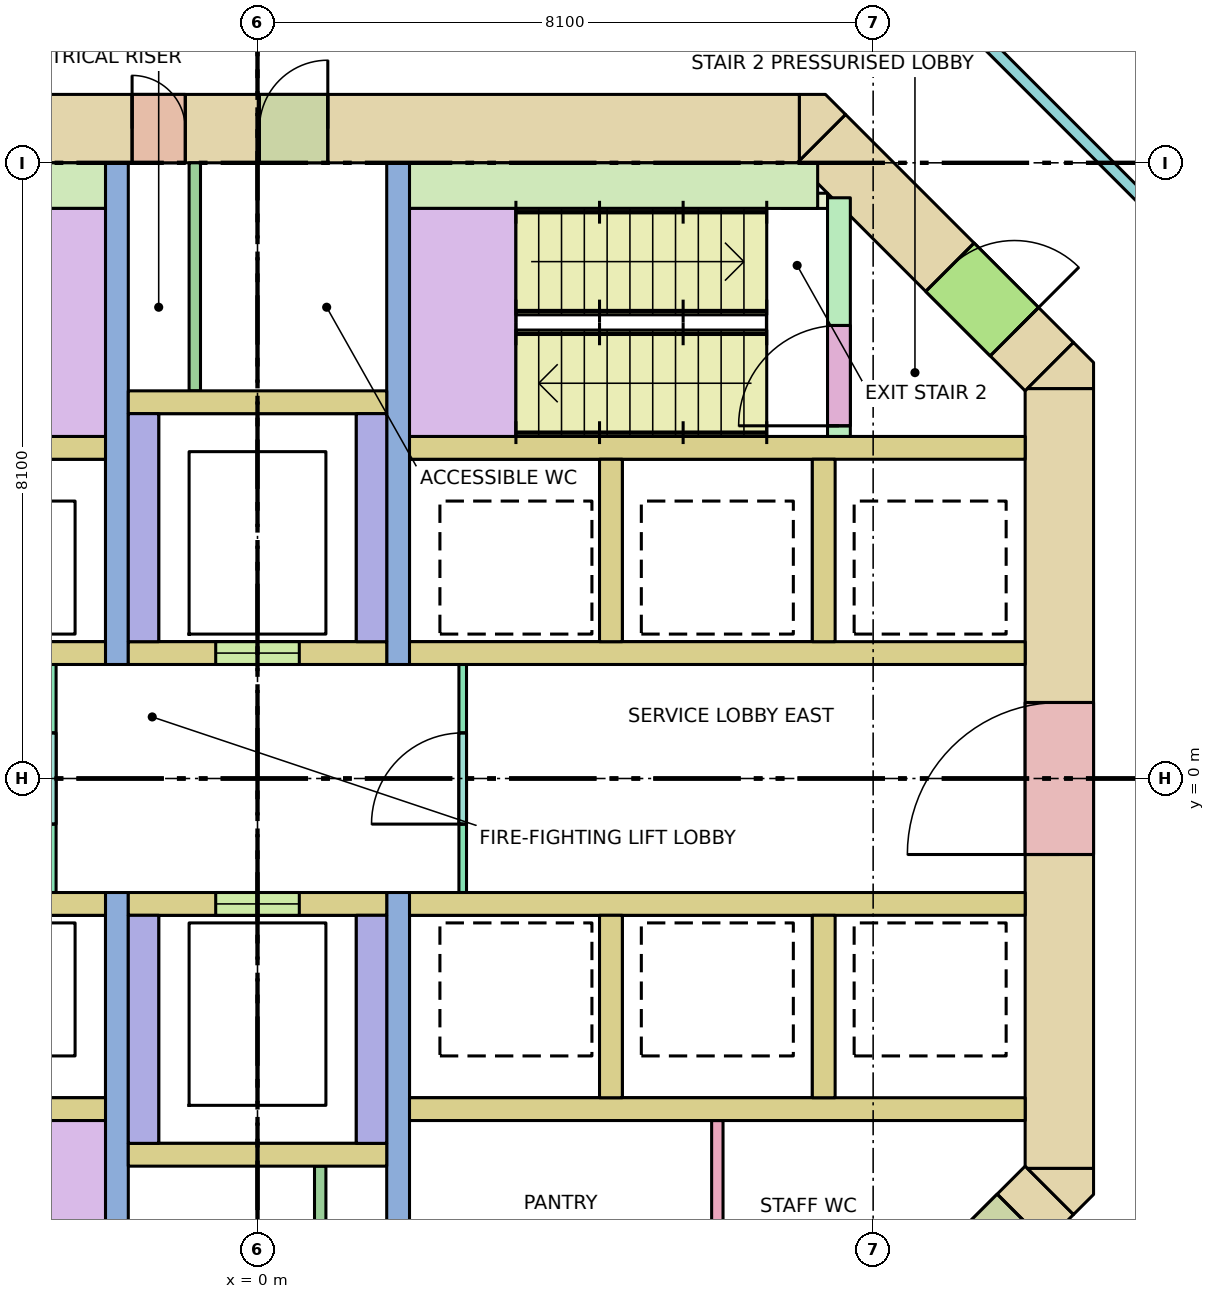
"""IFC4 building model, lengths in metres.
Left out: names, types, materials, properties, quantities, classifications, styles, units other than length and angle.
Written with IfcOpenShell. Run it as: python <this file> out.ifc"""

import sys

from ifc_helpers import new_model, si_unit, direction, frame, frame_2d, origin, place, context, subcontext, project, spatial, polyline, rectangle, outline, extrude, element, fill, save


model = new_model("IFC4")
c1 = context("Model", 3, precision=1e-05, world=origin(), true_north=direction((0.0, 1.0)))
c2 = subcontext(c1, "Body", "Model", "MODEL_VIEW")
j1 = project(units=[si_unit("LENGTHUNIT", "METRE"), si_unit("PLANEANGLEUNIT", "RADIAN")], contexts=[c1])
p1 = place(None, origin())
s1 = spatial("IfcSite", under=j1, at=p1, CompositionType="ELEMENT")
p2 = place(p1, origin())
s2 = spatial("IfcBuilding", under=s1, at=p2, CompositionType="ELEMENT")
p3 = place(p2, frame((0.0, 0.0, 27.0)))
s3 = spatial("IfcBuildingStorey", under=s2, at=p3, CompositionType="ELEMENT", Elevation=27.0)
p4 = place(p3, frame((-7.13, 8.55, -0.28), z_axis=(0.0, 0.0, 1.0), x_axis=(1.0, 0.0, 0.0)))
e1 = element("IfcWall", 1, at=p4, inside=s3, PredefinedType="SHEAR", context=c2, shape_type="SweptSolid", body=[
    extrude(rectangle(XDim=14.26, YDim=0.9, at=frame_2d((7.13, 0.0))), origin(), (0.0, 0.0, 1.0), 4.0),
])
p5 = place(p4, frame((5.48, 0.0, 0.28)))
e2 = element("IfcOpeningElement", 2, at=p5, cuts=e1, PredefinedType="OPENING", context=c2, shape_type="SweptSolid", body=[
    extrude(rectangle(XDim=0.7, YDim=2.1, at=frame_2d((0.35, 1.05))), frame((0.0, 0.46, 0.0), z_axis=(0.0, -1.0, 0.0), x_axis=(1.0, 0.0, 0.0)), (0.0, 0.0, 1.0), 0.92),
])
p6 = place(p4, frame((7.155, 0.0, 0.28)))
e3 = element("IfcOpeningElement", 3, at=p6, cuts=e1, PredefinedType="OPENING", context=c2, shape_type="SweptSolid", body=[
    extrude(rectangle(XDim=0.9, YDim=2.1, at=frame_2d((0.45, 1.05))), frame((0.0, 0.46, 0.0), z_axis=(0.0, -1.0, 0.0), x_axis=(1.0, 0.0, 0.0)), (0.0, 0.0, 1.0), 0.92),
])
p7 = place(p3, frame((10.55, -5.13, -0.28), z_axis=(0.0, 0.0, 1.0), x_axis=(0.0, 1.0, 0.0)))
e4 = element("IfcWall", 4, at=p7, inside=s3, PredefinedType="SHEAR", context=c2, shape_type="SweptSolid", body=[
    extrude(rectangle(XDim=10.26, YDim=0.9, at=frame_2d((5.13, 0.0))), origin(), (0.0, 0.0, 1.0), 4.0),
])
p8 = place(p7, frame((4.13, 0.0, 0.28)))
e5 = element("IfcOpeningElement", 5, at=p8, cuts=e4, PredefinedType="OPENING", context=c2, shape_type="SweptSolid", body=[
    extrude(rectangle(XDim=2.0, YDim=2.1, at=frame_2d((1.0, 1.05))), frame((0.0, 0.46, 0.0), z_axis=(0.0, -1.0, 0.0), x_axis=(1.0, 0.0, 0.0)), (0.0, 0.0, 1.0), 0.92),
])
p9 = place(p3, frame((7.418, 8.418, -0.28), z_axis=(0.0, 0.0, 1.0), x_axis=(0.707106781187, -0.707106781187, 0.0)))
e6 = element("IfcWall", 6, at=p9, inside=s3, PredefinedType="SHEAR", context=c2, shape_type="SweptSolid", body=[
    extrude(rectangle(XDim=4.243, YDim=0.9, at=frame_2d((2.121, 0.0))), origin(), (0.0, 0.0, 1.0), 4.0),
])
p10 = place(p9, frame((2.393, 0.0, 0.28)))
e7 = element("IfcOpeningElement", 7, at=p10, cuts=e6, PredefinedType="OPENING", context=c2, shape_type="SweptSolid", body=[
    extrude(rectangle(XDim=1.2, YDim=2.1, at=frame_2d((0.6, 1.05))), frame((0.0, 0.46, 0.0), z_axis=(0.0, -1.0, 0.0), x_axis=(1.0, 0.0, 0.0)), (0.0, 0.0, 1.0), 0.92),
])
p11 = place(p3, frame((10.418, -5.418, -0.28), z_axis=(0.0, 0.0, 1.0), x_axis=(-0.707106781187, -0.707106781187, 0.0)))
e8 = element("IfcWall", 8, at=p11, inside=s3, PredefinedType="SHEAR", context=c2, shape_type="SweptSolid", body=[
    extrude(rectangle(XDim=4.243, YDim=0.9, at=frame_2d((2.121, 0.0))), origin(), (0.0, 0.0, 1.0), 4.0),
])
p12 = place(p11, frame((0.52, 0.0, 0.28)))
e9 = element("IfcOpeningElement", 9, at=p12, cuts=e8, PredefinedType="OPENING", context=c2, shape_type="SweptSolid", body=[
    extrude(rectangle(XDim=0.9, YDim=2.1, at=frame_2d((0.45, 1.05))), frame((0.0, 0.46, 0.0), z_axis=(0.0, -1.0, 0.0), x_axis=(1.0, 0.0, 0.0)), (0.0, 0.0, 1.0), 0.92),
])
p13 = place(p3, frame((0.0, 0.0, -0.28)))
e10 = element("IfcWall", 10, at=p13, inside=s3, PredefinedType="SHEAR", context=c2, shape_type="SweptSolid", body=[
    extrude(outline(polyline([(11.0, -5.473), (10.736, -5.736), (10.13, -5.13), (11.0, -5.13), (11.0, -5.473)])), origin(), (0.0, 0.0, 1.0), 4.0),
])
p14 = place(p3, frame((0.0, 0.0, -0.28)))
e11 = element("IfcWall", 11, at=p14, inside=s3, PredefinedType="SHEAR", context=c2, shape_type="SweptSolid", body=[
    extrude(outline(polyline([(11.0, 5.473), (11.0, 5.13), (10.13, 5.13), (10.736, 5.736), (11.0, 5.473)])), origin(), (0.0, 0.0, 1.0), 4.0),
])
p15 = place(p3, frame((0.0, 0.0, -0.28)))
e12 = element("IfcWall", 12, at=p15, inside=s3, PredefinedType="SHEAR", context=c2, shape_type="SweptSolid", body=[
    extrude(outline(polyline([(7.473, 9.0), (7.736, 8.736), (7.13, 8.13), (7.13, 9.0), (7.473, 9.0)])), origin(), (0.0, 0.0, 1.0), 4.0),
])
for number, where, z_axis, x_axis in (
    (13, (-10.1, 4.35, 0.0), (0.0, 0.0, 1.0), (1.0, 0.0, 0.0)),
    (14, (-10.1, -4.35, 0.0), (0.0, 0.0, 1.0), (1.0, 0.0, 0.0)),
    (15, (2.0, 4.35, 0.0), (0.0, 0.0, 1.0), (1.0, 0.0, 0.0)),
    (16, (2.0, -4.35, 0.0), (0.0, 0.0, 1.0), (1.0, 0.0, 0.0)),
):
    element("IfcWall", number, at=place(p3, frame(where, z_axis=z_axis, x_axis=x_axis)), inside=s3, PredefinedType="SOLIDWALL", context=c2, shape_type="SweptSolid", body=[
        extrude(rectangle(XDim=8.1, YDim=0.3, at=frame_2d((4.05, 0.0))), origin(), (0.0, 0.0, 1.0), 3.72),
    ])
p16 = place(p3, frame((-10.1, 1.65, 0.0), z_axis=(0.0, 0.0, 1.0), x_axis=(1.0, 0.0, 0.0)))
e17 = element("IfcWall", 17, at=p16, inside=s3, PredefinedType="SOLIDWALL", context=c2, shape_type="SweptSolid", body=[
    extrude(rectangle(XDim=8.1, YDim=0.3, at=frame_2d((4.05, 0.0))), origin(), (0.0, 0.0, 1.0), 3.72),
])
p17 = place(p16, frame((0.7, 0.0, 0.0)))
e18 = element("IfcOpeningElement", 18, at=p17, cuts=e17, PredefinedType="OPENING", context=c2, shape_type="SweptSolid", body=[
    extrude(rectangle(XDim=1.1, YDim=2.1, at=frame_2d((0.55, 1.05))), frame((0.0, 0.16, 0.0), z_axis=(0.0, -1.0, 0.0), x_axis=(1.0, 0.0, 0.0)), (0.0, 0.0, 1.0), 0.32),
])
p18 = place(p16, frame((3.5, 0.0, 0.0)))
e19 = element("IfcOpeningElement", 19, at=p18, cuts=e17, PredefinedType="OPENING", context=c2, shape_type="SweptSolid", body=[
    extrude(rectangle(XDim=1.1, YDim=2.1, at=frame_2d((0.55, 1.05))), frame((0.0, 0.16, 0.0), z_axis=(0.0, -1.0, 0.0), x_axis=(1.0, 0.0, 0.0)), (0.0, 0.0, 1.0), 0.32),
])
p19 = place(p16, frame((6.15, 0.0, 0.0)))
e20 = element("IfcOpeningElement", 20, at=p19, cuts=e17, PredefinedType="OPENING", context=c2, shape_type="SweptSolid", body=[
    extrude(rectangle(XDim=1.1, YDim=2.1, at=frame_2d((0.55, 1.05))), frame((0.0, 0.16, 0.0), z_axis=(0.0, -1.0, 0.0), x_axis=(1.0, 0.0, 0.0)), (0.0, 0.0, 1.0), 0.32),
])
p20 = place(p3, frame((-10.1, -1.65, 0.0), z_axis=(0.0, 0.0, 1.0), x_axis=(1.0, 0.0, 0.0)))
e21 = element("IfcWall", 21, at=p20, inside=s3, PredefinedType="SOLIDWALL", context=c2, shape_type="SweptSolid", body=[
    extrude(rectangle(XDim=8.1, YDim=0.3, at=frame_2d((4.05, 0.0))), origin(), (0.0, 0.0, 1.0), 3.72),
])
p21 = place(p20, frame((0.7, 0.0, 0.0)))
e22 = element("IfcOpeningElement", 22, at=p21, cuts=e21, PredefinedType="OPENING", context=c2, shape_type="SweptSolid", body=[
    extrude(rectangle(XDim=1.1, YDim=2.1, at=frame_2d((0.55, 1.05))), frame((0.0, 0.16, 0.0), z_axis=(0.0, -1.0, 0.0), x_axis=(1.0, 0.0, 0.0)), (0.0, 0.0, 1.0), 0.32),
])
p22 = place(p20, frame((3.5, 0.0, 0.0)))
e23 = element("IfcOpeningElement", 23, at=p22, cuts=e21, PredefinedType="OPENING", context=c2, shape_type="SweptSolid", body=[
    extrude(rectangle(XDim=1.1, YDim=2.1, at=frame_2d((0.55, 1.05))), frame((0.0, 0.16, 0.0), z_axis=(0.0, -1.0, 0.0), x_axis=(1.0, 0.0, 0.0)), (0.0, 0.0, 1.0), 0.32),
])
p23 = place(p20, frame((6.15, 0.0, 0.0)))
e24 = element("IfcOpeningElement", 24, at=p23, cuts=e21, PredefinedType="OPENING", context=c2, shape_type="SweptSolid", body=[
    extrude(rectangle(XDim=1.1, YDim=2.1, at=frame_2d((0.55, 1.05))), frame((0.0, 0.16, 0.0), z_axis=(0.0, -1.0, 0.0), x_axis=(1.0, 0.0, 0.0)), (0.0, 0.0, 1.0), 0.32),
])
for number, where, z_axis, x_axis in (
    (25, (2.0, 1.65, 0.0), (0.0, 0.0, 1.0), (1.0, 0.0, 0.0)),
    (26, (2.0, -1.65, 0.0), (0.0, 0.0, 1.0), (1.0, 0.0, 0.0)),
):
    element("IfcWall", number, at=place(p3, frame(where, z_axis=z_axis, x_axis=x_axis)), inside=s3, PredefinedType="SOLIDWALL", context=c2, shape_type="SweptSolid", body=[
        extrude(rectangle(XDim=8.1, YDim=0.3, at=frame_2d((4.05, 0.0))), origin(), (0.0, 0.0, 1.0), 3.72),
    ])
for number, where, z_axis, x_axis in (
    (27, (4.65, 1.8, 0.0), (0.0, 0.0, 1.0), (0.0, 1.0, 0.0)),
    (28, (4.65, -4.2, 0.0), (0.0, 0.0, 1.0), (0.0, 1.0, 0.0)),
    (29, (7.45, 1.8, 0.0), (0.0, 0.0, 1.0), (0.0, 1.0, 0.0)),
    (30, (7.45, -4.2, 0.0), (0.0, 0.0, 1.0), (0.0, 1.0, 0.0)),
):
    element("IfcWall", number, at=place(p3, frame(where, z_axis=z_axis, x_axis=x_axis)), inside=s3, PredefinedType="SOLIDWALL", context=c2, shape_type="SweptSolid", body=[
        extrude(rectangle(XDim=2.4, YDim=0.3, at=frame_2d((1.2, 0.0))), origin(), (0.0, 0.0, 1.0), 3.72),
    ])
for number, where, z_axis, x_axis in (
    (31, (-1.85, 1.5, 0.0), (0.0, 0.0, 1.0), (0.0, 1.0, 0.0)),
    (32, (-1.85, -8.1, 0.0), (0.0, 0.0, 1.0), (0.0, 1.0, 0.0)),
    (33, (1.85, 1.5, 0.0), (0.0, 0.0, 1.0), (0.0, 1.0, 0.0)),
    (34, (1.85, -8.1, 0.0), (0.0, 0.0, 1.0), (0.0, 1.0, 0.0)),
):
    element("IfcWall", number, at=place(p3, frame(where, z_axis=z_axis, x_axis=x_axis)), inside=s3, PredefinedType="SHEAR", context=c2, shape_type="SweptSolid", body=[
        extrude(rectangle(XDim=6.6, YDim=0.3, at=frame_2d((3.3, 0.0))), origin(), (0.0, 0.0, 1.0), 3.72),
    ])
p24 = place(p3, frame((-1.7, 1.65, 0.0), z_axis=(0.0, 0.0, 1.0), x_axis=(1.0, 0.0, 0.0)))
e35 = element("IfcWall", 35, at=p24, inside=s3, PredefinedType="SOLIDWALL", context=c2, shape_type="SweptSolid", body=[
    extrude(rectangle(XDim=3.4, YDim=0.3, at=frame_2d((1.7, 0.0))), origin(), (0.0, 0.0, 1.0), 3.72),
])
p25 = place(p24, frame((1.15, 0.0, 0.0)))
e36 = element("IfcOpeningElement", 36, at=p25, cuts=e35, PredefinedType="OPENING", context=c2, shape_type="SweptSolid", body=[
    extrude(rectangle(XDim=1.1, YDim=2.1, at=frame_2d((0.55, 1.05))), frame((0.0, 0.16, 0.0), z_axis=(0.0, -1.0, 0.0), x_axis=(1.0, 0.0, 0.0)), (0.0, 0.0, 1.0), 0.32),
])
p26 = place(p3, frame((-1.7, -1.65, 0.0), z_axis=(0.0, 0.0, 1.0), x_axis=(1.0, 0.0, 0.0)))
e37 = element("IfcWall", 37, at=p26, inside=s3, PredefinedType="SOLIDWALL", context=c2, shape_type="SweptSolid", body=[
    extrude(rectangle(XDim=3.4, YDim=0.3, at=frame_2d((1.7, 0.0))), origin(), (0.0, 0.0, 1.0), 3.72),
])
p27 = place(p26, frame((1.15, 0.0, 0.0)))
e38 = element("IfcOpeningElement", 38, at=p27, cuts=e37, PredefinedType="OPENING", context=c2, shape_type="SweptSolid", body=[
    extrude(rectangle(XDim=1.1, YDim=2.1, at=frame_2d((0.55, 1.05))), frame((0.0, 0.16, 0.0), z_axis=(0.0, -1.0, 0.0), x_axis=(1.0, 0.0, 0.0)), (0.0, 0.0, 1.0), 0.32),
])
for number, where, z_axis, x_axis in (
    (39, (-1.5, 1.8, 0.0), (0.0, 0.0, 1.0), (0.0, 1.0, 0.0)),
    (40, (-1.5, -4.8, 0.0), (0.0, 0.0, 1.0), (0.0, 1.0, 0.0)),
    (41, (1.5, 1.8, 0.0), (0.0, 0.0, 1.0), (0.0, 1.0, 0.0)),
    (42, (1.5, -4.8, 0.0), (0.0, 0.0, 1.0), (0.0, 1.0, 0.0)),
):
    element("IfcWall", number, at=place(p3, frame(where, z_axis=z_axis, x_axis=x_axis)), inside=s3, PredefinedType="SOLIDWALL", context=c2, shape_type="SweptSolid", body=[
        extrude(rectangle(XDim=3.0, YDim=0.4, at=frame_2d((1.5, 0.0))), origin(), (0.0, 0.0, 1.0), 3.72),
    ])
for number, where, z_axis, x_axis in (
    (43, (-1.7, 4.95, 0.0), (0.0, 0.0, 1.0), (1.0, 0.0, 0.0)),
    (44, (-1.7, -4.95, 0.0), (0.0, 0.0, 1.0), (1.0, 0.0, 0.0)),
):
    element("IfcWall", number, at=place(p3, frame(where, z_axis=z_axis, x_axis=x_axis)), inside=s3, PredefinedType="SOLIDWALL", context=c2, shape_type="SweptSolid", body=[
        extrude(rectangle(XDim=3.4, YDim=0.3, at=frame_2d((1.7, 0.0))), origin(), (0.0, 0.0, 1.0), 3.72),
    ])
p28 = place(p3, frame((-7.37, 7.8, 0.0), z_axis=(0.0, 0.0, 1.0), x_axis=(1.0, 0.0, 0.0)))
e45 = element("IfcWall", 45, at=p28, inside=s3, PredefinedType="SHEAR", context=c2, shape_type="SweptSolid", body=[
    extrude(rectangle(XDim=5.37, YDim=0.6, at=frame_2d((2.685, 0.0))), origin(), (0.0, 0.0, 1.0), 3.72),
])
p29 = place(p3, frame((7.65, 4.5, 0.0), z_axis=(0.0, 0.0, 1.0), x_axis=(0.0, 1.0, 0.0)))
e46 = element("IfcWall", 46, at=p29, inside=s3, PredefinedType="SHEAR", context=c2, shape_type="SweptSolid", body=[
    extrude(rectangle(XDim=3.14, YDim=0.3, at=frame_2d((1.57, 0.0))), origin(), (0.0, 0.0, 1.0), 3.72),
])
p30 = place(p29, frame((0.14, 0.0, 0.0)))
e47 = element("IfcOpeningElement", 47, at=p30, cuts=e46, PredefinedType="OPENING", context=c2, shape_type="SweptSolid", body=[
    extrude(rectangle(XDim=1.32, YDim=2.1, at=frame_2d((0.66, 1.05))), frame((0.0, 0.16, 0.0), z_axis=(0.0, -1.0, 0.0), x_axis=(1.0, 0.0, 0.0)), (0.0, 0.0, 1.0), 0.32),
])
p31 = place(p3, frame((2.0, 7.8, 0.0), z_axis=(0.0, 0.0, 1.0), x_axis=(1.0, 0.0, 0.0)))
e48 = element("IfcWall", 48, at=p31, inside=s3, PredefinedType="SHEAR", context=c2, shape_type="SweptSolid", body=[
    extrude(rectangle(XDim=5.37, YDim=0.6, at=frame_2d((2.685, 0.0))), origin(), (0.0, 0.0, 1.0), 3.72),
])
p32 = place(p3, frame((6.9, 7.6, 0.0), z_axis=(0.0, 0.0, 1.0), x_axis=(1.0, 0.0, 0.0)))
e49 = element("IfcWall", 49, at=p32, inside=s3, PredefinedType="SHEAR", context=c2, shape_type="SweptSolid", body=[
    extrude(rectangle(XDim=0.6, YDim=0.2, at=frame_2d((0.3, 0.0))), origin(), (0.0, 0.0, 1.0), 3.72),
])
p33 = place(p3, frame((-2.7, -1.5, 0.0), z_axis=(0.0, 0.0, 1.0), x_axis=(0.0, 1.0, 0.0)))
e50 = element("IfcWall", 50, at=p33, inside=s3, PredefinedType="PARTITIONING", context=c2, shape_type="SweptSolid", body=[
    extrude(rectangle(XDim=3.0, YDim=0.1, at=frame_2d((1.5, 0.0))), origin(), (0.0, 0.0, 1.0), 3.72),
])
p34 = place(p33, frame((0.9, 0.0, 0.0)))
e51 = element("IfcOpeningElement", 51, at=p34, cuts=e50, PredefinedType="OPENING", context=c2, shape_type="SweptSolid", body=[
    extrude(rectangle(XDim=1.2, YDim=2.1, at=frame_2d((0.6, 1.05))), frame((0.0, 0.06, 0.0), z_axis=(0.0, -1.0, 0.0), x_axis=(1.0, 0.0, 0.0)), (0.0, 0.0, 1.0), 0.12),
])
p35 = place(p3, frame((2.7, -1.5, 0.0), z_axis=(0.0, 0.0, 1.0), x_axis=(0.0, 1.0, 0.0)))
e52 = element("IfcWall", 52, at=p35, inside=s3, PredefinedType="PARTITIONING", context=c2, shape_type="SweptSolid", body=[
    extrude(rectangle(XDim=3.0, YDim=0.1, at=frame_2d((1.5, 0.0))), origin(), (0.0, 0.0, 1.0), 3.72),
])
p36 = place(p35, frame((0.9, 0.0, 0.0)))
e53 = element("IfcOpeningElement", 53, at=p36, cuts=e52, PredefinedType="OPENING", context=c2, shape_type="SweptSolid", body=[
    extrude(rectangle(XDim=1.2, YDim=2.1, at=frame_2d((0.6, 1.05))), frame((0.0, 0.06, 0.0), z_axis=(0.0, -1.0, 0.0), x_axis=(1.0, 0.0, 0.0)), (0.0, 0.0, 1.0), 0.12),
])
for number, where, z_axis, x_axis in (
    (54, (-0.825, 5.1, 0.0), (0.0, 0.0, 1.0), (0.0, 1.0, 0.0)),
    (55, (0.825, -8.1, 0.0), (0.0, 0.0, 1.0), (0.0, 1.0, 0.0)),
):
    element("IfcWall", number, at=place(p3, frame(where, z_axis=z_axis, x_axis=x_axis)), inside=s3, PredefinedType="PARTITIONING", context=c2, shape_type="SweptSolid", body=[
        extrude(rectangle(XDim=3.0, YDim=0.15, at=frame_2d((1.5, 0.0))), origin(), (0.0, 0.0, 1.0), 3.72),
    ])
p37 = place(p3, frame((6.05, -8.1, 0.0), z_axis=(0.0, 0.0, 1.0), x_axis=(0.0, 1.0, 0.0)))
e56 = element("IfcWall", 56, at=p37, inside=s3, PredefinedType="PARTITIONING", context=c2, shape_type="SweptSolid", body=[
    extrude(rectangle(XDim=3.6, YDim=0.15, at=frame_2d((1.8, 0.0))), origin(), (0.0, 0.0, 1.0), 3.72),
])
p38 = place(p3, frame((8.328, 10.938, 0.0), z_axis=(0.0, 0.0, 1.0), x_axis=(0.707125355289, -0.707088206597, 0.0)))
e57 = element("IfcWall", 57, at=p38, inside=s3, PredefinedType="PARTITIONING", context=c2, shape_type="SweptSolid", body=[
    extrude(rectangle(XDim=6.572, YDim=0.15, at=frame_2d((3.286, 0.0))), origin(), (0.0, 0.0, 1.0), 2.82),
])
p39 = place(p25, origin())
e58 = element("IfcDoor", 58, at=p39, inside=s3, OperationType="DOUBLE_DOOR_SLIDING", PredefinedType="DOOR", context=c2, shape_type="SweptSolid", body=[
    extrude(rectangle(XDim=1.1, YDim=2.1, at=frame_2d((0.55, 1.05))), frame((0.0, 0.025, 0.0), z_axis=(0.0, -1.0, 0.0), x_axis=(1.0, 0.0, 0.0)), (0.0, 0.0, 1.0), 0.05),
])
fill(e36, e58)
p40 = place(p27, origin())
e59 = element("IfcDoor", 59, at=p40, inside=s3, OperationType="DOUBLE_DOOR_SLIDING", PredefinedType="DOOR", context=c2, shape_type="SweptSolid", body=[
    extrude(rectangle(XDim=1.1, YDim=2.1, at=frame_2d((0.55, 1.05))), frame((0.0, 0.025, 0.0), z_axis=(0.0, -1.0, 0.0), x_axis=(1.0, 0.0, 0.0)), (0.0, 0.0, 1.0), 0.05),
])
fill(e38, e59)
p41 = place(p30, origin())
e60 = element("IfcDoor", 60, at=p41, inside=s3, OperationType="DOUBLE_DOOR_SINGLE_SWING", PredefinedType="DOOR", context=c2, shape_type="SweptSolid", body=[
    extrude(rectangle(XDim=1.32, YDim=2.1, at=frame_2d((0.66, 1.05))), frame((0.0, 0.025, 0.0), z_axis=(0.0, -1.0, 0.0), x_axis=(1.0, 0.0, 0.0)), (0.0, 0.0, 1.0), 0.05),
])
fill(e47, e60)
p42 = place(p10, origin())
e61 = element("IfcDoor", 61, at=p42, inside=s3, OperationType="SINGLE_SWING_RIGHT", PredefinedType="DOOR", context=c2, shape_type="SweptSolid", body=[
    extrude(rectangle(XDim=1.2, YDim=2.1, at=frame_2d((0.6, 1.05))), frame((0.0, 0.025, 0.0), z_axis=(0.0, -1.0, 0.0), x_axis=(1.0, 0.0, 0.0)), (0.0, 0.0, 1.0), 0.05),
])
fill(e7, e61)
p43 = place(p8, origin())
e62 = element("IfcDoor", 62, at=p43, inside=s3, OperationType="DOUBLE_DOOR_SINGLE_SWING", PredefinedType="DOOR", context=c2, shape_type="SweptSolid", body=[
    extrude(rectangle(XDim=2.0, YDim=2.1, at=frame_2d((1.0, 1.05))), frame((0.0, 0.025, 0.0), z_axis=(0.0, -1.0, 0.0), x_axis=(1.0, 0.0, 0.0)), (0.0, 0.0, 1.0), 0.05),
])
fill(e5, e62)
p44 = place(p34, origin())
e63 = element("IfcDoor", 63, at=p44, inside=s3, OperationType="SINGLE_SWING_LEFT", PredefinedType="DOOR", context=c2, shape_type="SweptSolid", body=[
    extrude(rectangle(XDim=1.2, YDim=2.1, at=frame_2d((0.6, 1.05))), frame((0.0, 0.025, 0.0), z_axis=(0.0, -1.0, 0.0), x_axis=(1.0, 0.0, 0.0)), (0.0, 0.0, 1.0), 0.05),
])
fill(e51, e63)
p45 = place(p36, origin())
e64 = element("IfcDoor", 64, at=p45, inside=s3, OperationType="SINGLE_SWING_LEFT", PredefinedType="DOOR", context=c2, shape_type="SweptSolid", body=[
    extrude(rectangle(XDim=1.2, YDim=2.1, at=frame_2d((0.6, 1.05))), frame((0.0, 0.025, 0.0), z_axis=(0.0, -1.0, 0.0), x_axis=(1.0, 0.0, 0.0)), (0.0, 0.0, 1.0), 0.05),
])
fill(e53, e64)
p46 = place(p5, origin())
e65 = element("IfcDoor", 65, at=p46, inside=s3, OperationType="SINGLE_SWING_LEFT", PredefinedType="DOOR", context=c2, shape_type="SweptSolid", body=[
    extrude(rectangle(XDim=0.7, YDim=2.1, at=frame_2d((0.35, 1.05))), frame((0.0, 0.025, 0.0), z_axis=(0.0, -1.0, 0.0), x_axis=(1.0, 0.0, 0.0)), (0.0, 0.0, 1.0), 0.05),
])
fill(e2, e65)
p47 = place(p6, origin())
e66 = element("IfcDoor", 66, at=p47, inside=s3, OperationType="SINGLE_SWING_RIGHT", PredefinedType="DOOR", context=c2, shape_type="SweptSolid", body=[
    extrude(rectangle(XDim=0.9, YDim=2.1, at=frame_2d((0.45, 1.05))), frame((0.0, 0.025, 0.0), z_axis=(0.0, -1.0, 0.0), x_axis=(1.0, 0.0, 0.0)), (0.0, 0.0, 1.0), 0.05),
])
fill(e3, e66)
p48 = place(p12, origin())
e67 = element("IfcDoor", 67, at=p48, inside=s3, OperationType="SINGLE_SWING_RIGHT", PredefinedType="DOOR", context=c2, shape_type="SweptSolid", body=[
    extrude(rectangle(XDim=0.9, YDim=2.1, at=frame_2d((0.45, 1.05))), frame((0.0, 0.025, 0.0), z_axis=(0.0, -1.0, 0.0), x_axis=(1.0, 0.0, 0.0)), (0.0, 0.0, 1.0), 0.05),
])
fill(e9, e67)
save(model, sys.argv[1])
